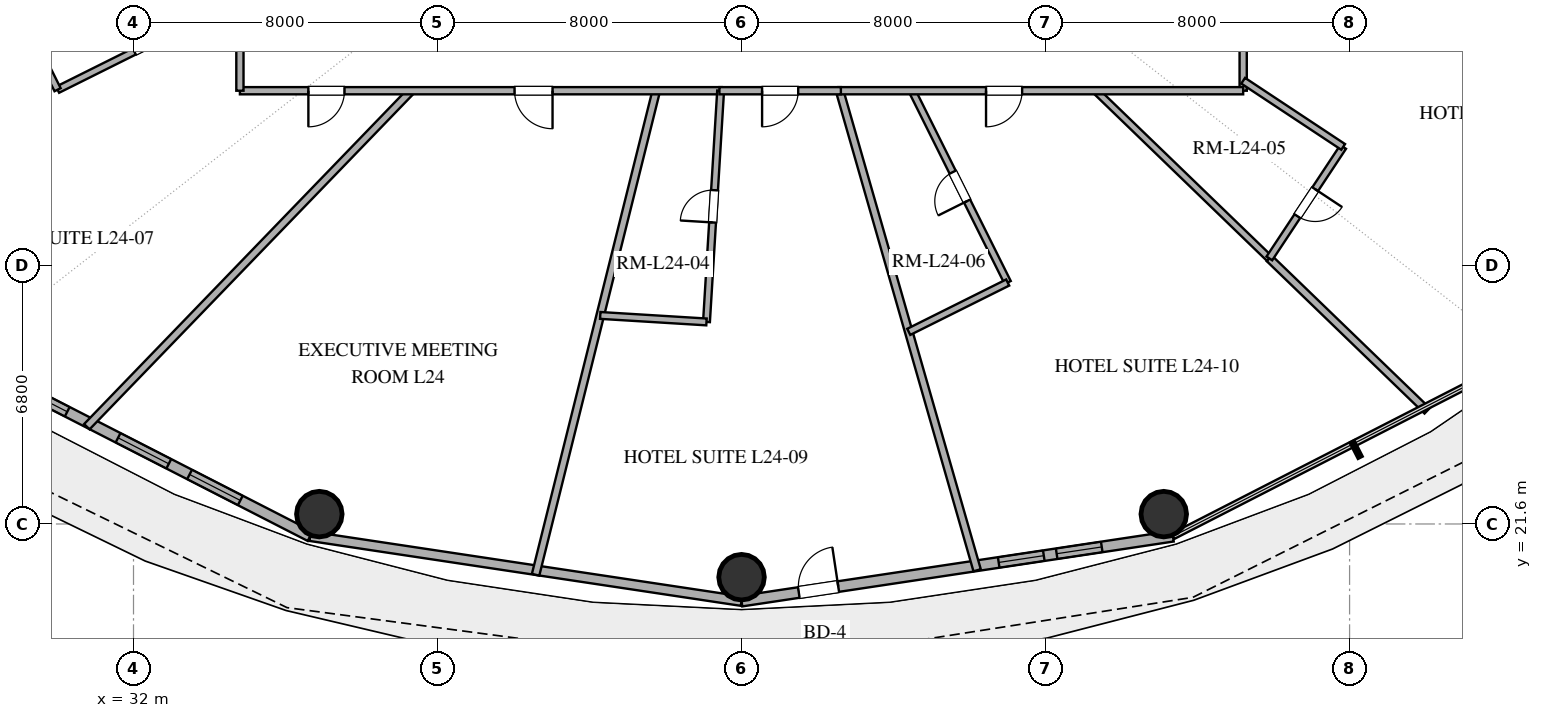
"""IFC4 building model, lengths in metres.
Left out: names, types, materials, properties, quantities, classifications, styles, units other than length and angle.
Written with IfcOpenShell. Run it as: python <this file> out.ifc"""

import sys

from ifc_helpers import new_model, si_unit, direction, frame, frame_2d, origin, origin_2d, place, context, subcontext, project, spatial, rectangle, hollow_circle, extrude, element, fill, save


model = new_model("IFC4")
c1 = context("Model", 3, precision=1e-05, world=origin(), true_north=direction((0.0, 1.0)))
c2 = subcontext(c1, "Body", "Model", "MODEL_VIEW")
j1 = project(units=[si_unit("LENGTHUNIT", "METRE"), si_unit("PLANEANGLEUNIT", "RADIAN")], contexts=[c1])
p1 = place(None, origin())
s1 = spatial("IfcSite", under=j1, at=p1, CompositionType="ELEMENT")
p2 = place(p1, origin())
s2 = spatial("IfcBuilding", under=s1, at=p2, CompositionType="ELEMENT")
p3 = place(p2, frame((0.0, 0.0, 98.4)))
s3 = spatial("IfcBuildingStorey", under=s2, at=p3, CompositionType="ELEMENT", Elevation=98.4)
for number, where, z_axis, x_axis in (
    (1, (36.89, 21.859, 0.0), (0.0, 0.0, 1.0), (1.0, 0.0, 0.0)),
    (2, (48.0, 20.2, 0.0), (0.0, 0.0, 1.0), (1.0, 0.0, 0.0)),
    (3, (59.11, 21.859, 0.0), (0.0, 0.0, 1.0), (1.0, 0.0, 0.0)),
):
    element("IfcColumn", number, at=place(p3, frame(where, z_axis=z_axis, x_axis=x_axis)), inside=s3, PredefinedType="COLUMN", context=c2, shape_type="SweptSolid", body=[
        extrude(hollow_circle(Radius=0.6, WallThickness=0.032, at=origin_2d()), origin(), (0.0, 0.0, 1.0), 3.38),
    ])
p4 = place(p3, frame((27.16, 26.14, 0.0), z_axis=(0.0, 0.0, 1.0), x_axis=(0.889959505023, -0.45603955905, 0.0)))
e4 = element("IfcWall", 4, at=p4, inside=s3, PredefinedType="SOLIDWALL", context=c2, shape_type="SweptSolid", body=[
    extrude(rectangle(XDim=10.662, YDim=0.28, at=frame_2d((5.331, 0.0))), origin(), (0.0, 0.0, 1.0), 3.38),
])
p5 = place(p4, frame((1.979, 0.0, 0.85)))
e5 = element("IfcOpeningElement", 5, at=p5, cuts=e4, PredefinedType="OPENING", context=c2, shape_type="SweptSolid", body=[
    extrude(rectangle(XDim=1.5, YDim=2.0, at=frame_2d((0.75, 1.0))), frame((0.0, 0.15, 0.0), z_axis=(0.0, -1.0, 0.0), x_axis=(1.0, 0.0, 0.0)), (0.0, 0.0, 1.0), 0.3),
])
p6 = place(p4, frame((4.982, 0.0, 0.85)))
e6 = element("IfcOpeningElement", 6, at=p6, cuts=e4, PredefinedType="OPENING", context=c2, shape_type="SweptSolid", body=[
    extrude(rectangle(XDim=1.5, YDim=1.8, at=frame_2d((0.75, 0.9))), frame((0.0, 0.15, 0.0), z_axis=(0.0, -1.0, 0.0), x_axis=(1.0, 0.0, 0.0)), (0.0, 0.0, 1.0), 0.3),
])
p7 = place(p4, frame((7.096, 0.0, 0.85)))
e7 = element("IfcOpeningElement", 7, at=p7, cuts=e4, PredefinedType="OPENING", context=c2, shape_type="SweptSolid", body=[
    extrude(rectangle(XDim=1.5, YDim=1.8, at=frame_2d((0.75, 0.9))), frame((0.0, 0.15, 0.0), z_axis=(0.0, -1.0, 0.0), x_axis=(1.0, 0.0, 0.0)), (0.0, 0.0, 1.0), 0.3),
])
p8 = place(p3, frame((36.649, 21.277, 0.0), z_axis=(0.0, 0.0, 1.0), x_axis=(0.988877774656, -0.148730450117, 0.0)))
e8 = element("IfcWall", 8, at=p8, inside=s3, PredefinedType="SOLIDWALL", context=c2, shape_type="SweptSolid", body=[
    extrude(rectangle(XDim=11.479, YDim=0.25, at=frame_2d((5.74, 0.0))), origin(), (0.0, 0.0, 1.0), 3.38),
])
p9 = place(p3, frame((48.0, 19.57, 0.0), z_axis=(0.0, 0.0, 1.0), x_axis=(0.988877774656, 0.148730450117, 0.0)))
e9 = element("IfcWall", 9, at=p9, inside=s3, PredefinedType="SOLIDWALL", context=c2, shape_type="SweptSolid", body=[
    extrude(rectangle(XDim=11.479, YDim=0.28, at=frame_2d((5.74, 0.0))), origin(), (0.0, 0.0, 1.0), 3.38),
])
p10 = place(p9, frame((1.524, 0.0, 0.0)))
e10 = element("IfcOpeningElement", 10, at=p10, cuts=e9, PredefinedType="OPENING", context=c2, shape_type="SweptSolid", body=[
    extrude(rectangle(XDim=1.05, YDim=2.2, at=frame_2d((0.525, 1.1))), frame((0.0, 0.15, 0.0), z_axis=(0.0, -1.0, 0.0), x_axis=(1.0, 0.0, 0.0)), (0.0, 0.0, 1.0), 0.3),
])
p11 = place(p9, frame((6.843, 0.0, 0.85)))
e11 = element("IfcOpeningElement", 11, at=p11, cuts=e9, PredefinedType="OPENING", context=c2, shape_type="SweptSolid", body=[
    extrude(rectangle(XDim=1.2, YDim=1.8, at=frame_2d((0.6, 0.9))), frame((0.0, 0.15, 0.0), z_axis=(0.0, -1.0, 0.0), x_axis=(1.0, 0.0, 0.0)), (0.0, 0.0, 1.0), 0.3),
])
p12 = place(p9, frame((8.385, 0.0, 0.85)))
e12 = element("IfcOpeningElement", 12, at=p12, cuts=e9, PredefinedType="OPENING", context=c2, shape_type="SweptSolid", body=[
    extrude(rectangle(XDim=1.2, YDim=1.8, at=frame_2d((0.6, 0.9))), frame((0.0, 0.15, 0.0), z_axis=(0.0, -1.0, 0.0), x_axis=(1.0, 0.0, 0.0)), (0.0, 0.0, 1.0), 0.3),
])
p13 = place(p3, frame((30.772, 24.16, 0.0), z_axis=(0.0, 0.0, 1.0), x_axis=(0.694672506389, 0.719326149161, 0.0)))
e13 = element("IfcWall", 13, at=p13, inside=s3, PredefinedType="PARTITIONING", context=c2, shape_type="SweptSolid", body=[
    extrude(rectangle(XDim=12.289, YDim=0.2, at=frame_2d((6.145, 0.0))), origin(), (0.0, 0.0, 1.0), 2.74),
])
p14 = place(p3, frame((45.756, 33.0, 0.0), z_axis=(0.0, 0.0, 1.0), x_axis=(-0.241918476077, -0.970296578852, 0.0)))
e14 = element("IfcWall", 14, at=p14, inside=s3, PredefinedType="PARTITIONING", context=c2, shape_type="SweptSolid", body=[
    extrude(rectangle(XDim=13.125, YDim=0.2, at=frame_2d((6.563, 0.0))), origin(), (0.0, 0.0, 1.0), 2.74),
])
p15 = place(p3, frame((50.581, 33.0, 0.0), z_axis=(0.0, 0.0, 1.0), x_axis=(0.275639731411, -0.961261014745, 0.0)))
e15 = element("IfcWall", 15, at=p15, inside=s3, PredefinedType="PARTITIONING", context=c2, shape_type="SweptSolid", body=[
    extrude(rectangle(XDim=13.126, YDim=0.2, at=frame_2d((6.563, 0.0))), origin(), (0.0, 0.0, 1.0), 2.74),
])
p16 = place(p3, frame((47.482, 33.0, 0.0), z_axis=(0.0, 0.0, 1.0), x_axis=(-1.0, 0.0, 0.0)))
e16 = element("IfcWall", 16, at=p16, inside=s3, PredefinedType="PARTITIONING", context=c2, shape_type="SweptSolid", body=[
    extrude(rectangle(XDim=12.682, YDim=0.19, at=frame_2d((6.341, 0.0))), origin(), (0.0, 0.0, 1.0), 2.74),
])
p17 = place(p16, frame((4.455, 0.0, 0.0)))
e17 = element("IfcOpeningElement", 17, at=p17, cuts=e16, PredefinedType="OPENING", context=c2, shape_type="SweptSolid", body=[
    extrude(rectangle(XDim=1.0, YDim=2.2, at=frame_2d((0.5, 1.1))), frame((0.0, 0.105, 0.0), z_axis=(0.0, -1.0, 0.0), x_axis=(1.0, 0.0, 0.0)), (0.0, 0.0, 1.0), 0.21),
])
p18 = place(p16, frame((9.93, 0.0, 0.0)))
e18 = element("IfcOpeningElement", 18, at=p18, cuts=e16, PredefinedType="OPENING", context=c2, shape_type="SweptSolid", body=[
    extrude(rectangle(XDim=0.95, YDim=2.15, at=frame_2d((0.475, 1.075))), frame((0.0, 0.105, 0.0), z_axis=(0.0, -1.0, 0.0), x_axis=(1.0, 0.0, 0.0)), (0.0, 0.0, 1.0), 0.21),
])
p19 = place(p3, frame((61.889, 28.587, 0.0), z_axis=(0.0, 0.0, 1.0), x_axis=(-0.719318009274, 0.694680935059, 0.0)))
e19 = element("IfcWall", 19, at=p19, inside=s3, PredefinedType="PLUMBINGWALL", context=c2, shape_type="SweptSolid", body=[
    extrude(rectangle(XDim=6.352, YDim=0.18, at=frame_2d((3.176, 0.0))), origin(), (0.0, 0.0, 1.0), 2.74),
])
p20 = place(p3, frame((47.077, 26.916, 0.0), z_axis=(0.0, 0.0, 1.0), x_axis=(0.061044096749, 0.998135070144, 0.0)))
e20 = element("IfcWall", 20, at=p20, inside=s3, PredefinedType="PLUMBINGWALL", context=c2, shape_type="SweptSolid", body=[
    extrude(rectangle(XDim=6.095, YDim=0.18, at=frame_2d((3.048, 0.0))), origin(), (0.0, 0.0, 1.0), 2.74),
])
p21 = place(p20, frame((2.623, 0.0, 0.0)))
e21 = element("IfcOpeningElement", 21, at=p21, cuts=e20, PredefinedType="OPENING", context=c2, shape_type="SweptSolid", body=[
    extrude(rectangle(XDim=0.85, YDim=2.1, at=frame_2d((0.425, 1.05))), frame((0.0, 0.1, 0.0), z_axis=(0.0, -1.0, 0.0), x_axis=(1.0, 0.0, 0.0)), (0.0, 0.0, 1.0), 0.2),
])
p22 = place(p3, frame((66.041, 24.578, 0.0), z_axis=(0.0, 0.0, 1.0), x_axis=(-0.719370121813, 0.694626970281, 0.0)))
e22 = element("IfcWall", 22, at=p22, inside=s3, PredefinedType="PARTITIONING", context=c2, shape_type="SweptSolid", body=[
    extrude(rectangle(XDim=5.772, YDim=0.2, at=frame_2d((2.886, 0.0))), origin(), (0.0, 0.0, 1.0), 2.74),
])
p23 = place(p3, frame((55.003, 27.953, 0.0), z_axis=(0.0, 0.0, 1.0), x_axis=(-0.446174269641, 0.894946099556, 0.0)))
e23 = element("IfcWall", 23, at=p23, inside=s3, PredefinedType="PLUMBINGWALL", context=c2, shape_type="SweptSolid", body=[
    extrude(rectangle(XDim=5.639, YDim=0.18, at=frame_2d((2.82, 0.0))), origin(), (0.0, 0.0, 1.0), 2.74),
])
p24 = place(p23, frame((2.395, 0.0, 0.0)))
e24 = element("IfcOpeningElement", 24, at=p24, cuts=e23, PredefinedType="OPENING", context=c2, shape_type="SweptSolid", body=[
    extrude(rectangle(XDim=0.85, YDim=2.1, at=frame_2d((0.425, 1.05))), frame((0.0, 0.1, 0.0), z_axis=(0.0, -1.0, 0.0), x_axis=(1.0, 0.0, 0.0)), (0.0, 0.0, 1.0), 0.2),
])
p25 = place(p3, frame((61.2, 41.225, 0.0), z_axis=(0.0, 0.0, 1.0), x_axis=(0.0, -1.0, 0.0)))
e25 = element("IfcWall", 25, at=p25, inside=s3, PredefinedType="PARTITIONING", context=c2, shape_type="SweptSolid", body=[
    extrude(rectangle(XDim=8.225, YDim=0.19, at=frame_2d((4.112, 0.0))), origin(), (0.0, 0.0, 1.0), 2.74),
])
p26 = place(p25, frame((4.767, 0.0, 0.0)))
e26 = element("IfcOpeningElement", 26, at=p26, cuts=e25, PredefinedType="OPENING", context=c2, shape_type="SweptSolid", body=[
    extrude(rectangle(XDim=0.95, YDim=2.15, at=frame_2d((0.475, 1.075))), frame((0.0, 0.105, 0.0), z_axis=(0.0, -1.0, 0.0), x_axis=(1.0, 0.0, 0.0)), (0.0, 0.0, 1.0), 0.21),
])
p27 = place(p3, frame((30.002, 33.027, 0.0), z_axis=(0.0, 0.0, 1.0), x_axis=(0.894936648514, 0.446193226244, 0.0)))
e27 = element("IfcWall", 27, at=p27, inside=s3, PredefinedType="PLUMBINGWALL", context=c2, shape_type="SweptSolid", body=[
    extrude(rectangle(XDim=5.361, YDim=0.18, at=frame_2d((2.681, 0.0))), origin(), (0.0, 0.0, 1.0), 2.74),
])
p28 = place(p27, frame((2.256, 0.0, 0.0)))
e28 = element("IfcOpeningElement", 28, at=p28, cuts=e27, PredefinedType="OPENING", context=c2, shape_type="SweptSolid", body=[
    extrude(rectangle(XDim=0.85, YDim=2.1, at=frame_2d((0.425, 1.05))), frame((0.0, 0.1, 0.0), z_axis=(0.0, -1.0, 0.0), x_axis=(1.0, 0.0, 0.0)), (0.0, 0.0, 1.0), 0.2),
])
p29 = place(p3, frame((61.2, 33.0, 0.0), z_axis=(0.0, 0.0, 1.0), x_axis=(-1.0, 0.0, 0.0)))
e29 = element("IfcWall", 29, at=p29, inside=s3, PredefinedType="PARTITIONING", context=c2, shape_type="SweptSolid", body=[
    extrude(rectangle(XDim=10.653, YDim=0.19, at=frame_2d((5.326, 0.0))), origin(), (0.0, 0.0, 1.0), 2.74),
])
p30 = place(p29, frame((5.816, 0.0, 0.0)))
e30 = element("IfcOpeningElement", 30, at=p30, cuts=e29, PredefinedType="OPENING", context=c2, shape_type="SweptSolid", body=[
    extrude(rectangle(XDim=0.95, YDim=2.15, at=frame_2d((0.475, 1.075))), frame((0.0, 0.105, 0.0), z_axis=(0.0, -1.0, 0.0), x_axis=(1.0, 0.0, 0.0)), (0.0, 0.0, 1.0), 0.21),
])
p31 = place(p3, frame((34.8, 33.0, 0.0), z_axis=(0.0, 0.0, 1.0), x_axis=(0.0, 1.0, 0.0)))
e31 = element("IfcWall", 31, at=p31, inside=s3, PredefinedType="PARTITIONING", context=c2, shape_type="SweptSolid", body=[
    extrude(rectangle(XDim=9.839, YDim=0.19, at=frame_2d((4.92, 0.0))), origin(), (0.0, 0.0, 1.0), 2.74),
])
p32 = place(p31, frame((7.035, 0.0, 0.0)))
e32 = element("IfcOpeningElement", 32, at=p32, cuts=e31, PredefinedType="OPENING", context=c2, shape_type="SweptSolid", body=[
    extrude(rectangle(XDim=0.95, YDim=2.15, at=frame_2d((0.475, 1.075))), frame((0.0, 0.105, 0.0), z_axis=(0.0, -1.0, 0.0), x_axis=(1.0, 0.0, 0.0)), (0.0, 0.0, 1.0), 0.21),
])
p33 = place(p3, frame((28.339, 36.362, 0.0), z_axis=(0.0, 0.0, 1.0), x_axis=(0.446243949247, -0.894911357488, 0.0)))
e33 = element("IfcWall", 33, at=p33, inside=s3, PredefinedType="PLUMBINGWALL", context=c2, shape_type="SweptSolid", body=[
    extrude(rectangle(XDim=3.727, YDim=0.18, at=frame_2d((1.864, 0.0))), origin(), (0.0, 0.0, 1.0), 2.74),
])
p34 = place(p3, frame((63.831, 31.521, 0.0), z_axis=(0.0, 0.0, 1.0), x_axis=(-0.551959146688, -0.833871153349, 0.0)))
e34 = element("IfcWall", 34, at=p34, inside=s3, PredefinedType="PLUMBINGWALL", context=c2, shape_type="SweptSolid", body=[
    extrude(rectangle(XDim=3.519, YDim=0.18, at=frame_2d((1.759, 0.0))), origin(), (0.0, 0.0, 1.0), 2.74),
])
p35 = place(p34, frame((1.334, 0.0, 0.0)))
e35 = element("IfcOpeningElement", 35, at=p35, cuts=e34, PredefinedType="OPENING", context=c2, shape_type="SweptSolid", body=[
    extrude(rectangle(XDim=0.85, YDim=2.1, at=frame_2d((0.425, 1.05))), frame((0.0, 0.1, 0.0), z_axis=(0.0, -1.0, 0.0), x_axis=(1.0, 0.0, 0.0)), (0.0, 0.0, 1.0), 0.2),
])
p36 = place(p3, frame((50.614, 33.0, 0.0), z_axis=(0.0, 0.0, 1.0), x_axis=(-1.0, 0.0, 0.0)))
e36 = element("IfcWall", 36, at=p36, inside=s3, PredefinedType="PARTITIONING", context=c2, shape_type="SweptSolid", body=[
    extrude(rectangle(XDim=3.197, YDim=0.19, at=frame_2d((1.598, 0.0))), origin(), (0.0, 0.0, 1.0), 2.74),
])
p37 = place(p36, frame((1.123, 0.0, 0.0)))
e37 = element("IfcOpeningElement", 37, at=p37, cuts=e36, PredefinedType="OPENING", context=c2, shape_type="SweptSolid", body=[
    extrude(rectangle(XDim=0.95, YDim=2.15, at=frame_2d((0.475, 1.075))), frame((0.0, 0.105, 0.0), z_axis=(0.0, -1.0, 0.0), x_axis=(1.0, 0.0, 0.0)), (0.0, 0.0, 1.0), 0.21),
])
p38 = place(p3, frame((61.2, 33.263, 0.0), z_axis=(0.0, 0.0, 1.0), x_axis=(0.833855219674, -0.5519832177, 0.0)))
e38 = element("IfcWall", 38, at=p38, inside=s3, PredefinedType="PLUMBINGWALL", context=c2, shape_type="SweptSolid", body=[
    extrude(rectangle(XDim=3.155, YDim=0.18, at=frame_2d((1.578, 0.0))), origin(), (0.0, 0.0, 1.0), 2.74),
])
p39 = place(p3, frame((52.4, 26.655, 0.0), z_axis=(0.0, 0.0, 1.0), x_axis=(0.894913437672, 0.446239777558, 0.0)))
e39 = element("IfcWall", 39, at=p39, inside=s3, PredefinedType="PLUMBINGWALL", context=c2, shape_type="SweptSolid", body=[
    extrude(rectangle(XDim=2.909, YDim=0.18, at=frame_2d((1.455, 0.0))), origin(), (0.0, 0.0, 1.0), 2.74),
])
p40 = place(p3, frame((44.282, 27.087, 0.0), z_axis=(0.0, 0.0, 1.0), x_axis=(0.998136779925, -0.061016133608, 0.0)))
e40 = element("IfcWall", 40, at=p40, inside=s3, PredefinedType="PLUMBINGWALL", context=c2, shape_type="SweptSolid", body=[
    extrude(rectangle(XDim=2.801, YDim=0.18, at=frame_2d((1.4, 0.0))), origin(), (0.0, 0.0, 1.0), 2.74),
])
p41 = place(p5, origin())
e41 = element("IfcWindow", 41, at=p41, inside=s3, PartitioningType="SINGLE_PANEL", PredefinedType="WINDOW", context=c2, shape_type="SweptSolid", body=[
    extrude(rectangle(XDim=1.5, YDim=2.0, at=frame_2d((0.75, 1.0))), frame((0.0, 0.03, 0.0), z_axis=(0.0, -1.0, 0.0), x_axis=(1.0, 0.0, 0.0)), (0.0, 0.0, 1.0), 0.06),
])
fill(e5, e41)
p42 = place(p6, origin())
e42 = element("IfcWindow", 42, at=p42, inside=s3, PartitioningType="SINGLE_PANEL", PredefinedType="WINDOW", context=c2, shape_type="SweptSolid", body=[
    extrude(rectangle(XDim=1.5, YDim=1.8, at=frame_2d((0.75, 0.9))), frame((0.0, 0.03, 0.0), z_axis=(0.0, -1.0, 0.0), x_axis=(1.0, 0.0, 0.0)), (0.0, 0.0, 1.0), 0.06),
])
fill(e6, e42)
p43 = place(p7, origin())
e43 = element("IfcWindow", 43, at=p43, inside=s3, PartitioningType="SINGLE_PANEL", PredefinedType="WINDOW", context=c2, shape_type="SweptSolid", body=[
    extrude(rectangle(XDim=1.5, YDim=1.8, at=frame_2d((0.75, 0.9))), frame((0.0, 0.03, 0.0), z_axis=(0.0, -1.0, 0.0), x_axis=(1.0, 0.0, 0.0)), (0.0, 0.0, 1.0), 0.06),
])
fill(e7, e43)
p44 = place(p10, origin())
e44 = element("IfcDoor", 44, at=p44, inside=s3, OperationType="SINGLE_SWING_RIGHT", PredefinedType="DOOR", context=c2, shape_type="SweptSolid", body=[
    extrude(rectangle(XDim=1.05, YDim=2.2, at=frame_2d((0.525, 1.1))), frame((0.0, 0.025, 0.0), z_axis=(0.0, -1.0, 0.0), x_axis=(1.0, 0.0, 0.0)), (0.0, 0.0, 1.0), 0.05),
])
fill(e10, e44)
p45 = place(p11, origin())
e45 = element("IfcWindow", 45, at=p45, inside=s3, PartitioningType="SINGLE_PANEL", PredefinedType="WINDOW", context=c2, shape_type="SweptSolid", body=[
    extrude(rectangle(XDim=1.2, YDim=1.8, at=frame_2d((0.6, 0.9))), frame((0.0, 0.03, 0.0), z_axis=(0.0, -1.0, 0.0), x_axis=(1.0, 0.0, 0.0)), (0.0, 0.0, 1.0), 0.06),
])
fill(e11, e45)
p46 = place(p12, origin())
e46 = element("IfcWindow", 46, at=p46, inside=s3, PartitioningType="SINGLE_PANEL", PredefinedType="WINDOW", context=c2, shape_type="SweptSolid", body=[
    extrude(rectangle(XDim=1.2, YDim=1.8, at=frame_2d((0.6, 0.9))), frame((0.0, 0.03, 0.0), z_axis=(0.0, -1.0, 0.0), x_axis=(1.0, 0.0, 0.0)), (0.0, 0.0, 1.0), 0.06),
])
fill(e12, e46)
p47 = place(p17, origin())
e47 = element("IfcDoor", 47, at=p47, inside=s3, OperationType="SINGLE_SWING_LEFT", PredefinedType="DOOR", context=c2, shape_type="SweptSolid", body=[
    extrude(rectangle(XDim=1.0, YDim=2.2, at=frame_2d((0.5, 1.1))), frame((0.0, 0.025, 0.0), z_axis=(0.0, -1.0, 0.0), x_axis=(1.0, 0.0, 0.0)), (0.0, 0.0, 1.0), 0.05),
])
fill(e17, e47)
p48 = place(p18, origin())
e48 = element("IfcDoor", 48, at=p48, inside=s3, OperationType="SINGLE_SWING_RIGHT", PredefinedType="DOOR", context=c2, shape_type="SweptSolid", body=[
    extrude(rectangle(XDim=0.95, YDim=2.15, at=frame_2d((0.475, 1.075))), frame((0.0, 0.025, 0.0), z_axis=(0.0, -1.0, 0.0), x_axis=(1.0, 0.0, 0.0)), (0.0, 0.0, 1.0), 0.05),
])
fill(e18, e48)
p49 = place(p21, origin())
e49 = element("IfcDoor", 49, at=p49, inside=s3, OperationType="SINGLE_SWING_LEFT", PredefinedType="DOOR", context=c2, shape_type="SweptSolid", body=[
    extrude(rectangle(XDim=0.85, YDim=2.1, at=frame_2d((0.425, 1.05))), frame((0.0, 0.025, 0.0), z_axis=(0.0, -1.0, 0.0), x_axis=(1.0, 0.0, 0.0)), (0.0, 0.0, 1.0), 0.05),
])
fill(e21, e49)
p50 = place(p24, origin())
e50 = element("IfcDoor", 50, at=p50, inside=s3, OperationType="SINGLE_SWING_LEFT", PredefinedType="DOOR", context=c2, shape_type="SweptSolid", body=[
    extrude(rectangle(XDim=0.85, YDim=2.1, at=frame_2d((0.425, 1.05))), frame((0.0, 0.025, 0.0), z_axis=(0.0, -1.0, 0.0), x_axis=(1.0, 0.0, 0.0)), (0.0, 0.0, 1.0), 0.05),
])
fill(e24, e50)
p51 = place(p30, origin())
e51 = element("IfcDoor", 51, at=p51, inside=s3, OperationType="SINGLE_SWING_RIGHT", PredefinedType="DOOR", context=c2, shape_type="SweptSolid", body=[
    extrude(rectangle(XDim=0.95, YDim=2.15, at=frame_2d((0.475, 1.075))), frame((0.0, 0.025, 0.0), z_axis=(0.0, -1.0, 0.0), x_axis=(1.0, 0.0, 0.0)), (0.0, 0.0, 1.0), 0.05),
])
fill(e30, e51)
p52 = place(p35, origin())
e52 = element("IfcDoor", 52, at=p52, inside=s3, OperationType="SINGLE_SWING_LEFT", PredefinedType="DOOR", context=c2, shape_type="SweptSolid", body=[
    extrude(rectangle(XDim=0.85, YDim=2.1, at=frame_2d((0.425, 1.05))), frame((0.0, 0.025, 0.0), z_axis=(0.0, -1.0, 0.0), x_axis=(1.0, 0.0, 0.0)), (0.0, 0.0, 1.0), 0.05),
])
fill(e35, e52)
p53 = place(p37, origin())
e53 = element("IfcDoor", 53, at=p53, inside=s3, OperationType="SINGLE_SWING_RIGHT", PredefinedType="DOOR", context=c2, shape_type="SweptSolid", body=[
    extrude(rectangle(XDim=0.95, YDim=2.15, at=frame_2d((0.475, 1.075))), frame((0.0, 0.025, 0.0), z_axis=(0.0, -1.0, 0.0), x_axis=(1.0, 0.0, 0.0)), (0.0, 0.0, 1.0), 0.05),
])
fill(e37, e53)
save(model, sys.argv[1])
